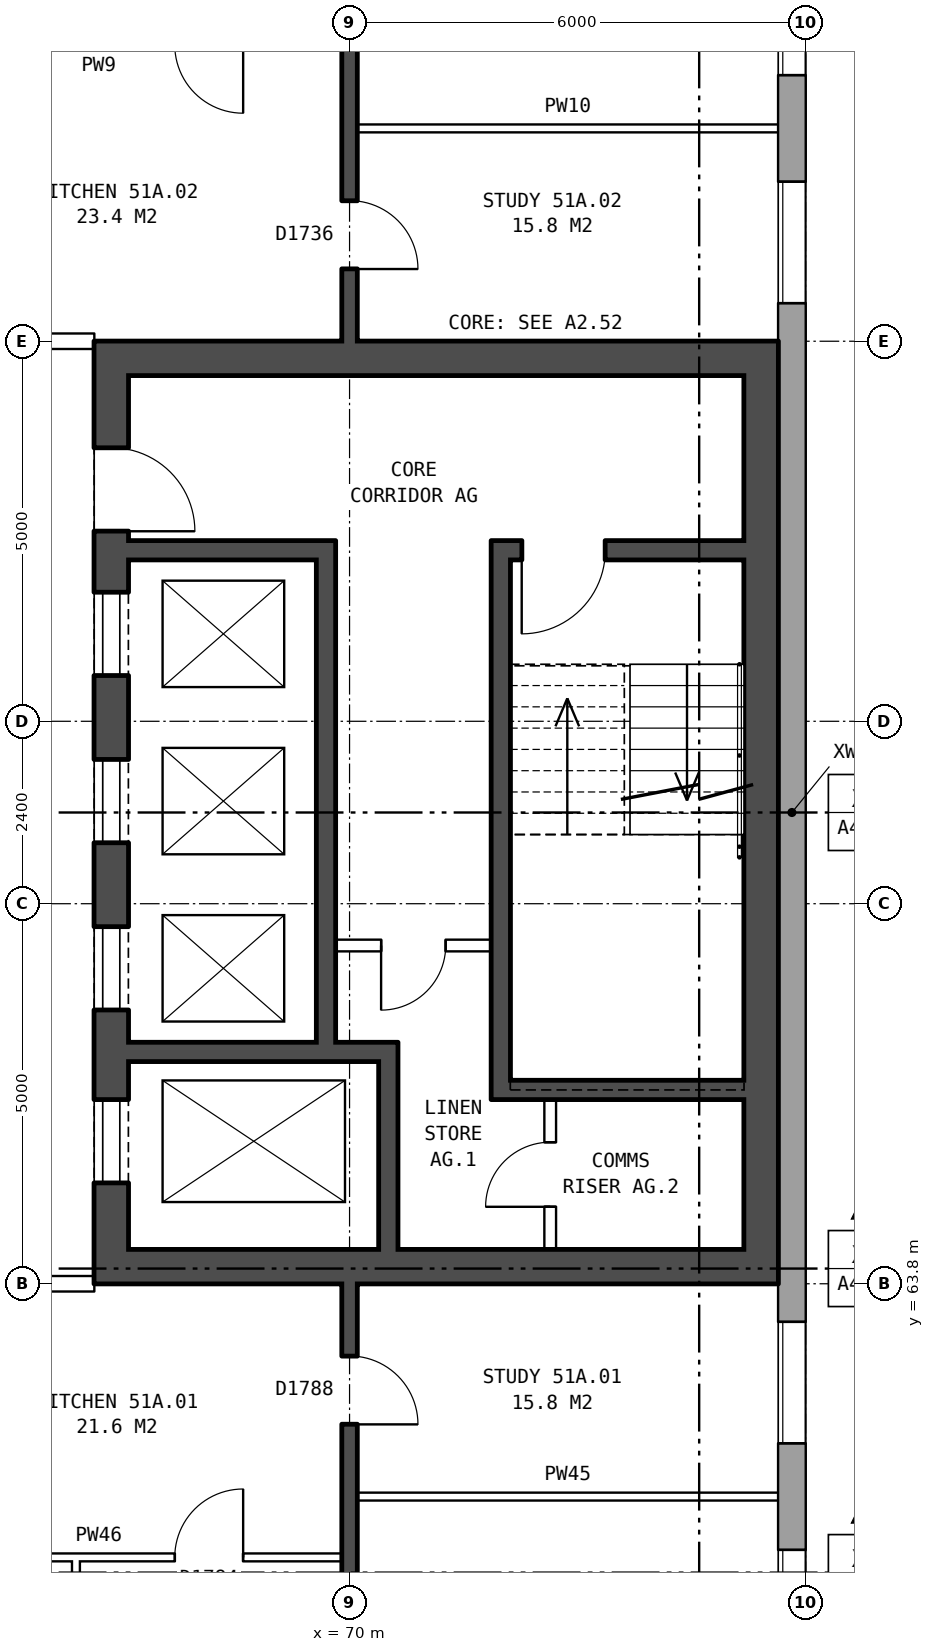
"""IFC4 building model, lengths in metres.
Left out: names, types, materials, properties, quantities, classifications, styles, units other than length and angle.
Written with IfcOpenShell. Run it as: python <this file> out.ifc"""

import sys

from ifc_helpers import new_model, si_unit, direction, frame, frame_2d, origin, place, context, subcontext, project, spatial, rectangle, extrude, element, fill, save


model = new_model("IFC4")
c1 = context("Model", 3, precision=1e-05, world=origin(), true_north=direction((0.0, 1.0)))
c2 = subcontext(c1, "Body", "Model", "MODEL_VIEW")
j1 = project(units=[si_unit("LENGTHUNIT", "METRE"), si_unit("PLANEANGLEUNIT", "RADIAN")], contexts=[c1])
p1 = place(None, origin())
s1 = spatial("IfcSite", under=j1, at=p1, CompositionType="ELEMENT")
p2 = place(p1, origin())
s2 = spatial("IfcBuilding", under=s1, at=p2, CompositionType="ELEMENT")
p3 = place(p2, frame((0.0, 0.0, 182.0)))
s3 = spatial("IfcBuildingStorey", under=s2, at=p3, CompositionType="ELEMENT", Elevation=182.0)
p4 = place(p3, frame((75.82, 57.075, 0.0), z_axis=(0.0, 0.0, 1.0), x_axis=(0.0, 1.0, 0.0)))
e1 = element("IfcWall", 1, at=p4, inside=s3, PredefinedType="STANDARD", context=c2, shape_type="SweptSolid", body=[
    extrude(rectangle(XDim=25.851, YDim=0.36, at=frame_2d((12.925, 0.0))), origin(), (0.0, 0.0, 1.0), 2.85),
])
p5 = place(p4, frame((1.625, 0.0, 0.8)))
e2 = element("IfcOpeningElement", 2, at=p5, cuts=e1, PredefinedType="OPENING", context=c2, shape_type="SweptSolid", body=[
    extrude(rectangle(XDim=1.6, YDim=1.8, at=frame_2d((0.8, 0.9))), frame((0.0, 0.19, 0.0), z_axis=(0.0, -1.0, 0.0), x_axis=(1.0, 0.0, 0.0)), (0.0, 0.0, 1.0), 0.38),
])
p6 = place(p4, frame((4.625, 0.0, 0.8)))
e3 = element("IfcOpeningElement", 3, at=p6, cuts=e1, PredefinedType="OPENING", context=c2, shape_type="SweptSolid", body=[
    extrude(rectangle(XDim=1.6, YDim=1.8, at=frame_2d((0.8, 0.9))), frame((0.0, 0.19, 0.0), z_axis=(0.0, -1.0, 0.0), x_axis=(1.0, 0.0, 0.0)), (0.0, 0.0, 1.0), 0.38),
])
p7 = place(p4, frame((19.625, 0.0, 0.8)))
e4 = element("IfcOpeningElement", 4, at=p7, cuts=e1, PredefinedType="OPENING", context=c2, shape_type="SweptSolid", body=[
    extrude(rectangle(XDim=1.6, YDim=1.8, at=frame_2d((0.8, 0.9))), frame((0.0, 0.19, 0.0), z_axis=(0.0, -1.0, 0.0), x_axis=(1.0, 0.0, 0.0)), (0.0, 0.0, 1.0), 0.38),
])
p8 = place(p4, frame((22.625, 0.0, 0.8)))
e5 = element("IfcOpeningElement", 5, at=p8, cuts=e1, PredefinedType="OPENING", context=c2, shape_type="SweptSolid", body=[
    extrude(rectangle(XDim=1.6, YDim=1.8, at=frame_2d((0.8, 0.9))), frame((0.0, 0.19, 0.0), z_axis=(0.0, -1.0, 0.0), x_axis=(1.0, 0.0, 0.0)), (0.0, 0.0, 1.0), 0.38),
])
p9 = place(p3, frame((66.865, 63.8, 0.0), z_axis=(0.0, 0.0, 1.0), x_axis=(0.0, 1.0, 0.0)))
e6 = element("IfcWall", 6, at=p9, inside=s3, PredefinedType="SHEAR", context=c2, shape_type="SweptSolid", body=[
    extrude(rectangle(XDim=12.4, YDim=0.45, at=frame_2d((6.2, 0.0))), origin(), (0.0, 0.0, 1.0), 2.85),
])
p10 = place(p9, frame((1.325, 0.0, 0.0)))
e7 = element("IfcOpeningElement", 7, at=p10, cuts=e6, PredefinedType="OPENING", context=c2, shape_type="SweptSolid", body=[
    extrude(rectangle(XDim=1.1, YDim=2.1, at=frame_2d((0.55, 1.05))), frame((0.0, 0.235, 0.0), z_axis=(0.0, -1.0, 0.0), x_axis=(1.0, 0.0, 0.0)), (0.0, 0.0, 1.0), 0.47),
])
p11 = place(p9, frame((3.6, 0.0, 0.0)))
e8 = element("IfcOpeningElement", 8, at=p11, cuts=e6, PredefinedType="OPENING", context=c2, shape_type="SweptSolid", body=[
    extrude(rectangle(XDim=1.1, YDim=2.1, at=frame_2d((0.55, 1.05))), frame((0.0, 0.235, 0.0), z_axis=(0.0, -1.0, 0.0), x_axis=(1.0, 0.0, 0.0)), (0.0, 0.0, 1.0), 0.47),
])
p12 = place(p9, frame((5.8, 0.0, 0.0)))
e9 = element("IfcOpeningElement", 9, at=p12, cuts=e6, PredefinedType="OPENING", context=c2, shape_type="SweptSolid", body=[
    extrude(rectangle(XDim=1.1, YDim=2.1, at=frame_2d((0.55, 1.05))), frame((0.0, 0.235, 0.0), z_axis=(0.0, -1.0, 0.0), x_axis=(1.0, 0.0, 0.0)), (0.0, 0.0, 1.0), 0.47),
])
p13 = place(p9, frame((8.0, 0.0, 0.0)))
e10 = element("IfcOpeningElement", 10, at=p13, cuts=e6, PredefinedType="OPENING", context=c2, shape_type="SweptSolid", body=[
    extrude(rectangle(XDim=1.1, YDim=2.1, at=frame_2d((0.55, 1.05))), frame((0.0, 0.235, 0.0), z_axis=(0.0, -1.0, 0.0), x_axis=(1.0, 0.0, 0.0)), (0.0, 0.0, 1.0), 0.47),
])
p14 = place(p9, frame((9.9, 0.0, 0.0)))
e11 = element("IfcOpeningElement", 11, at=p14, cuts=e6, PredefinedType="OPENING", context=c2, shape_type="SweptSolid", body=[
    extrude(rectangle(XDim=1.1, YDim=2.1, at=frame_2d((0.55, 1.05))), frame((0.0, 0.235, 0.0), z_axis=(0.0, -1.0, 0.0), x_axis=(1.0, 0.0, 0.0)), (0.0, 0.0, 1.0), 0.47),
])
p15 = place(p3, frame((75.415, 63.8, 0.0), z_axis=(0.0, 0.0, 1.0), x_axis=(0.0, 1.0, 0.0)))
e12 = element("IfcWall", 12, at=p15, inside=s3, PredefinedType="SHEAR", context=c2, shape_type="SweptSolid", body=[
    extrude(rectangle(XDim=12.4, YDim=0.45, at=frame_2d((6.2, 0.0))), origin(), (0.0, 0.0, 1.0), 2.85),
])
for number, where, z_axis, x_axis in (
    (13, (67.09, 64.025, 0.0), (0.0, 0.0, 1.0), (1.0, 0.0, 0.0)),
    (14, (67.09, 75.975, 0.0), (0.0, 0.0, 1.0), (1.0, 0.0, 0.0)),
):
    element("IfcWall", number, at=place(p3, frame(where, z_axis=z_axis, x_axis=x_axis)), inside=s3, PredefinedType="SHEAR", context=c2, shape_type="SweptSolid", body=[
        extrude(rectangle(XDim=8.1, YDim=0.45, at=frame_2d((4.05, 0.0))), origin(), (0.0, 0.0, 1.0), 2.85),
    ])
p16 = place(p3, frame((72.115, 66.35, 0.0), z_axis=(0.0, 0.0, 1.0), x_axis=(1.0, 0.0, 0.0)))
e15 = element("IfcWall", 15, at=p16, inside=s3, PredefinedType="SHEAR", context=c2, shape_type="SweptSolid", body=[
    extrude(rectangle(XDim=3.075, YDim=0.25, at=frame_2d((1.538, 0.0))), origin(), (0.0, 0.0, 1.0), 2.85),
])
p17 = place(p3, frame((67.09, 66.85, 0.0), z_axis=(0.0, 0.0, 1.0), x_axis=(1.0, 0.0, 0.0)))
e16 = element("IfcWall", 16, at=p17, inside=s3, PredefinedType="SHEAR", context=c2, shape_type="SweptSolid", body=[
    extrude(rectangle(XDim=3.545, YDim=0.25, at=frame_2d((1.772, 0.0))), origin(), (0.0, 0.0, 1.0), 2.85),
])
p18 = place(p3, frame((69.815, 68.25, 0.0), z_axis=(0.0, 0.0, 1.0), x_axis=(1.0, 0.0, 0.0)))
e17 = element("IfcWall", 17, at=p18, inside=s3, PredefinedType="PARTITIONING", context=c2, shape_type="SweptSolid", body=[
    extrude(rectangle(XDim=2.05, YDim=0.15, at=frame_2d((1.025, 0.0))), origin(), (0.0, 0.0, 1.0), 2.85),
])
p19 = place(p18, frame((0.6, 0.0, 0.0)))
e18 = element("IfcOpeningElement", 18, at=p19, cuts=e17, PredefinedType="OPENING", context=c2, shape_type="SweptSolid", body=[
    extrude(rectangle(XDim=0.85, YDim=2.1, at=frame_2d((0.425, 1.05))), frame((0.0, 0.085, 0.0), z_axis=(0.0, -1.0, 0.0), x_axis=(1.0, 0.0, 0.0)), (0.0, 0.0, 1.0), 0.17),
])
p20 = place(p3, frame((67.09, 73.45, 0.0), z_axis=(0.0, 0.0, 1.0), x_axis=(1.0, 0.0, 0.0)))
e19 = element("IfcWall", 19, at=p20, inside=s3, PredefinedType="SHEAR", context=c2, shape_type="SweptSolid", body=[
    extrude(rectangle(XDim=2.475, YDim=0.25, at=frame_2d((1.237, 0.0))), origin(), (0.0, 0.0, 1.0), 2.85),
])
p21 = place(p3, frame((72.115, 73.45, 0.0), z_axis=(0.0, 0.0, 1.0), x_axis=(1.0, 0.0, 0.0)))
e20 = element("IfcWall", 20, at=p21, inside=s3, PredefinedType="SHEAR", context=c2, shape_type="SweptSolid", body=[
    extrude(rectangle(XDim=3.075, YDim=0.25, at=frame_2d((1.538, 0.0))), origin(), (0.0, 0.0, 1.0), 2.85),
])
p22 = place(p21, frame((0.15, 0.0, 0.0)))
e21 = element("IfcOpeningElement", 21, at=p22, cuts=e20, PredefinedType="OPENING", context=c2, shape_type="SweptSolid", body=[
    extrude(rectangle(XDim=1.1, YDim=2.1, at=frame_2d((0.55, 1.05))), frame((0.0, 0.135, 0.0), z_axis=(0.0, -1.0, 0.0), x_axis=(1.0, 0.0, 0.0)), (0.0, 0.0, 1.0), 0.27),
])
p23 = place(p3, frame((69.69, 66.975, 0.0), z_axis=(0.0, 0.0, 1.0), x_axis=(0.0, 1.0, 0.0)))
e22 = element("IfcWall", 22, at=p23, inside=s3, PredefinedType="SHEAR", context=c2, shape_type="SweptSolid", body=[
    extrude(rectangle(XDim=6.6, YDim=0.25, at=frame_2d((3.3, 0.0))), origin(), (0.0, 0.0, 1.0), 2.85),
])
p24 = place(p3, frame((70.51, 64.25, 0.0), z_axis=(0.0, 0.0, 1.0), x_axis=(0.0, 1.0, 0.0)))
e23 = element("IfcWall", 23, at=p24, inside=s3, PredefinedType="SHEAR", context=c2, shape_type="SweptSolid", body=[
    extrude(rectangle(XDim=2.475, YDim=0.25, at=frame_2d((1.238, 0.0))), origin(), (0.0, 0.0, 1.0), 2.85),
])
p25 = place(p3, frame((71.99, 66.225, 0.0), z_axis=(0.0, 0.0, 1.0), x_axis=(0.0, 1.0, 0.0)))
e24 = element("IfcWall", 24, at=p25, inside=s3, PredefinedType="SHEAR", context=c2, shape_type="SweptSolid", body=[
    extrude(rectangle(XDim=7.35, YDim=0.25, at=frame_2d((3.675, 0.0))), origin(), (0.0, 0.0, 1.0), 2.85),
])
p26 = place(p3, frame((72.64, 64.25, 0.0), z_axis=(0.0, 0.0, 1.0), x_axis=(0.0, 1.0, 0.0)))
e25 = element("IfcWall", 25, at=p26, inside=s3, PredefinedType="PARTITIONING", context=c2, shape_type="SweptSolid", body=[
    extrude(rectangle(XDim=1.975, YDim=0.15, at=frame_2d((0.988, 0.0))), origin(), (0.0, 0.0, 1.0), 2.85),
])
p27 = place(p26, frame((0.562, 0.0, 0.0)))
e26 = element("IfcOpeningElement", 26, at=p27, cuts=e25, PredefinedType="OPENING", context=c2, shape_type="SweptSolid", body=[
    extrude(rectangle(XDim=0.85, YDim=2.1, at=frame_2d((0.425, 1.05))), frame((0.0, 0.085, 0.0), z_axis=(0.0, -1.0, 0.0), x_axis=(1.0, 0.0, 0.0)), (0.0, 0.0, 1.0), 0.17),
])
p28 = place(p3, frame((64.1, 60.2, 0.0), z_axis=(0.0, 0.0, 1.0), x_axis=(1.0, 0.0, 0.0)))
e27 = element("IfcWall", 27, at=p28, inside=s3, PredefinedType="PARTITIONING", context=c2, shape_type="SweptSolid", body=[
    extrude(rectangle(XDim=5.8, YDim=0.1, at=frame_2d((2.9, 0.0))), origin(), (0.0, 0.0, 1.0), 2.85),
])
p29 = place(p28, frame((3.6, 0.0, 0.0)))
e28 = element("IfcOpeningElement", 28, at=p29, cuts=e27, PredefinedType="OPENING", context=c2, shape_type="SweptSolid", body=[
    extrude(rectangle(XDim=0.9, YDim=2.1, at=frame_2d((0.45, 1.05))), frame((0.0, 0.06, 0.0), z_axis=(0.0, -1.0, 0.0), x_axis=(1.0, 0.0, 0.0)), (0.0, 0.0, 1.0), 0.12),
])
p30 = place(p28, frame((0.7, 0.0, 0.0)))
e29 = element("IfcOpeningElement", 29, at=p30, cuts=e27, PredefinedType="OPENING", context=c2, shape_type="SweptSolid", body=[
    extrude(rectangle(XDim=0.9, YDim=2.1, at=frame_2d((0.45, 1.05))), frame((0.0, 0.06, 0.0), z_axis=(0.0, -1.0, 0.0), x_axis=(1.0, 0.0, 0.0)), (0.0, 0.0, 1.0), 0.12),
])
p31 = place(p3, frame((70.1, 61.0, 0.0), z_axis=(0.0, 0.0, 1.0), x_axis=(1.0, 0.0, 0.0)))
e30 = element("IfcWall", 30, at=p31, inside=s3, PredefinedType="PARTITIONING", context=c2, shape_type="SweptSolid", body=[
    extrude(rectangle(XDim=5.54, YDim=0.1, at=frame_2d((2.77, 0.0))), origin(), (0.0, 0.0, 1.0), 2.85),
])
p32 = place(p3, frame((63.64, 63.8, 0.0), z_axis=(0.0, 0.0, 1.0), x_axis=(1.0, 0.0, 0.0)))
e31 = element("IfcWall", 31, at=p32, inside=s3, PredefinedType="PARTITIONING", context=c2, shape_type="SweptSolid", body=[
    extrude(rectangle(XDim=3.0, YDim=0.2, at=frame_2d((1.5, 0.0))), origin(), (0.0, 0.0, 1.0), 2.85),
])
p33 = place(p32, frame((1.18, 0.0, 0.0)))
e32 = element("IfcOpeningElement", 32, at=p33, cuts=e31, PredefinedType="OPENING", context=c2, shape_type="SweptSolid", body=[
    extrude(rectangle(XDim=1.0, YDim=2.1, at=frame_2d((0.5, 1.05))), frame((0.0, 0.11, 0.0), z_axis=(0.0, -1.0, 0.0), x_axis=(1.0, 0.0, 0.0)), (0.0, 0.0, 1.0), 0.22),
])
p34 = place(p3, frame((63.64, 76.2, 0.0), z_axis=(0.0, 0.0, 1.0), x_axis=(1.0, 0.0, 0.0)))
e33 = element("IfcWall", 33, at=p34, inside=s3, PredefinedType="PARTITIONING", context=c2, shape_type="SweptSolid", body=[
    extrude(rectangle(XDim=3.0, YDim=0.2, at=frame_2d((1.5, 0.0))), origin(), (0.0, 0.0, 1.0), 2.85),
])
p35 = place(p34, frame((1.18, 0.0, 0.0)))
e34 = element("IfcOpeningElement", 34, at=p35, cuts=e33, PredefinedType="OPENING", context=c2, shape_type="SweptSolid", body=[
    extrude(rectangle(XDim=1.0, YDim=2.1, at=frame_2d((0.5, 1.05))), frame((0.0, 0.11, 0.0), z_axis=(0.0, -1.0, 0.0), x_axis=(1.0, 0.0, 0.0)), (0.0, 0.0, 1.0), 0.22),
])
p36 = place(p3, frame((70.1, 79.0, 0.0), z_axis=(0.0, 0.0, 1.0), x_axis=(1.0, 0.0, 0.0)))
e35 = element("IfcWall", 35, at=p36, inside=s3, PredefinedType="PARTITIONING", context=c2, shape_type="SweptSolid", body=[
    extrude(rectangle(XDim=5.54, YDim=0.1, at=frame_2d((2.77, 0.0))), origin(), (0.0, 0.0, 1.0), 2.85),
])
p37 = place(p3, frame((66.4, 57.85, 0.0), z_axis=(0.0, 0.0, 1.0), x_axis=(0.0, 1.0, 0.0)))
e36 = element("IfcWall", 36, at=p37, inside=s3, PredefinedType="PARTITIONING", context=c2, shape_type="SweptSolid", body=[
    extrude(rectangle(XDim=2.3, YDim=0.1, at=frame_2d((1.15, 0.0))), origin(), (0.0, 0.0, 1.0), 2.85),
])
p38 = place(p3, frame((70.0, 54.36, 0.0), z_axis=(0.0, 0.0, 1.0), x_axis=(0.0, 1.0, 0.0)))
e37 = element("IfcWall", 37, at=p38, inside=s3, PredefinedType="SOLIDWALL", context=c2, shape_type="SweptSolid", body=[
    extrude(rectangle(XDim=9.44, YDim=0.2, at=frame_2d((4.72, 0.0))), origin(), (0.0, 0.0, 1.0), 2.85),
])
p39 = place(p38, frame((2.47, 0.0, 0.0)))
e38 = element("IfcOpeningElement", 38, at=p39, cuts=e37, PredefinedType="OPENING", context=c2, shape_type="SweptSolid", body=[
    extrude(rectangle(XDim=0.9, YDim=2.1, at=frame_2d((0.45, 1.05))), frame((0.0, 0.11, 0.0), z_axis=(0.0, -1.0, 0.0), x_axis=(1.0, 0.0, 0.0)), (0.0, 0.0, 1.0), 0.22),
])
p40 = place(p38, frame((7.59, 0.0, 0.0)))
e39 = element("IfcOpeningElement", 39, at=p40, cuts=e37, PredefinedType="OPENING", context=c2, shape_type="SweptSolid", body=[
    extrude(rectangle(XDim=0.9, YDim=2.1, at=frame_2d((0.45, 1.05))), frame((0.0, 0.11, 0.0), z_axis=(0.0, -1.0, 0.0), x_axis=(1.0, 0.0, 0.0)), (0.0, 0.0, 1.0), 0.22),
])
p41 = place(p3, frame((70.0, 76.2, 0.0), z_axis=(0.0, 0.0, 1.0), x_axis=(0.0, 1.0, 0.0)))
e40 = element("IfcWall", 40, at=p41, inside=s3, PredefinedType="SOLIDWALL", context=c2, shape_type="SweptSolid", body=[
    extrude(rectangle(XDim=9.44, YDim=0.2, at=frame_2d((4.72, 0.0))), origin(), (0.0, 0.0, 1.0), 2.85),
])
p42 = place(p41, frame((6.22, 0.0, 0.0)))
e41 = element("IfcOpeningElement", 41, at=p42, cuts=e40, PredefinedType="OPENING", context=c2, shape_type="SweptSolid", body=[
    extrude(rectangle(XDim=0.9, YDim=2.1, at=frame_2d((0.45, 1.05))), frame((0.0, 0.11, 0.0), z_axis=(0.0, -1.0, 0.0), x_axis=(1.0, 0.0, 0.0)), (0.0, 0.0, 1.0), 0.22),
])
p43 = place(p41, frame((0.95, 0.0, 0.0)))
e42 = element("IfcOpeningElement", 42, at=p43, cuts=e40, PredefinedType="OPENING", context=c2, shape_type="SweptSolid", body=[
    extrude(rectangle(XDim=0.9, YDim=2.1, at=frame_2d((0.45, 1.05))), frame((0.0, 0.11, 0.0), z_axis=(0.0, -1.0, 0.0), x_axis=(1.0, 0.0, 0.0)), (0.0, 0.0, 1.0), 0.22),
])
p44 = place(p5, origin())
e43 = element("IfcWindow", 43, at=p44, inside=s3, PartitioningType="SINGLE_PANEL", PredefinedType="WINDOW", context=c2, shape_type="SweptSolid", body=[
    extrude(rectangle(XDim=1.6, YDim=1.8, at=frame_2d((0.8, 0.9))), frame((0.0, 0.15, 0.0), z_axis=(0.0, -1.0, 0.0), x_axis=(1.0, 0.0, 0.0)), (0.0, 0.0, 1.0), 0.06),
])
fill(e2, e43)
p45 = place(p6, origin())
e44 = element("IfcWindow", 44, at=p45, inside=s3, PartitioningType="SINGLE_PANEL", PredefinedType="WINDOW", context=c2, shape_type="SweptSolid", body=[
    extrude(rectangle(XDim=1.6, YDim=1.8, at=frame_2d((0.8, 0.9))), frame((0.0, 0.15, 0.0), z_axis=(0.0, -1.0, 0.0), x_axis=(1.0, 0.0, 0.0)), (0.0, 0.0, 1.0), 0.06),
])
fill(e3, e44)
p46 = place(p7, origin())
e45 = element("IfcWindow", 45, at=p46, inside=s3, PartitioningType="SINGLE_PANEL", PredefinedType="WINDOW", context=c2, shape_type="SweptSolid", body=[
    extrude(rectangle(XDim=1.6, YDim=1.8, at=frame_2d((0.8, 0.9))), frame((0.0, 0.15, 0.0), z_axis=(0.0, -1.0, 0.0), x_axis=(1.0, 0.0, 0.0)), (0.0, 0.0, 1.0), 0.06),
])
fill(e4, e45)
p47 = place(p8, origin())
e46 = element("IfcWindow", 46, at=p47, inside=s3, PartitioningType="SINGLE_PANEL", PredefinedType="WINDOW", context=c2, shape_type="SweptSolid", body=[
    extrude(rectangle(XDim=1.6, YDim=1.8, at=frame_2d((0.8, 0.9))), frame((0.0, 0.15, 0.0), z_axis=(0.0, -1.0, 0.0), x_axis=(1.0, 0.0, 0.0)), (0.0, 0.0, 1.0), 0.06),
])
fill(e5, e46)
p48 = place(p10, origin())
e47 = element("IfcDoor", 47, at=p48, inside=s3, OperationType="DOUBLE_DOOR_SLIDING", PredefinedType="DOOR", context=c2, shape_type="SweptSolid", body=[
    extrude(rectangle(XDim=1.1, YDim=2.1, at=frame_2d((0.55, 1.05))), frame((0.0, -0.16, 0.0), z_axis=(0.0, -1.0, 0.0), x_axis=(1.0, 0.0, 0.0)), (0.0, 0.0, 1.0), 0.05),
])
fill(e7, e47)
p49 = place(p11, origin())
e48 = element("IfcDoor", 48, at=p49, inside=s3, OperationType="DOUBLE_DOOR_SLIDING", PredefinedType="DOOR", context=c2, shape_type="SweptSolid", body=[
    extrude(rectangle(XDim=1.1, YDim=2.1, at=frame_2d((0.55, 1.05))), frame((0.0, -0.16, 0.0), z_axis=(0.0, -1.0, 0.0), x_axis=(1.0, 0.0, 0.0)), (0.0, 0.0, 1.0), 0.05),
])
fill(e8, e48)
p50 = place(p12, origin())
e49 = element("IfcDoor", 49, at=p50, inside=s3, OperationType="DOUBLE_DOOR_SLIDING", PredefinedType="DOOR", context=c2, shape_type="SweptSolid", body=[
    extrude(rectangle(XDim=1.1, YDim=2.1, at=frame_2d((0.55, 1.05))), frame((0.0, -0.16, 0.0), z_axis=(0.0, -1.0, 0.0), x_axis=(1.0, 0.0, 0.0)), (0.0, 0.0, 1.0), 0.05),
])
fill(e9, e49)
p51 = place(p13, origin())
e50 = element("IfcDoor", 50, at=p51, inside=s3, OperationType="DOUBLE_DOOR_SLIDING", PredefinedType="DOOR", context=c2, shape_type="SweptSolid", body=[
    extrude(rectangle(XDim=1.1, YDim=2.1, at=frame_2d((0.55, 1.05))), frame((0.0, -0.16, 0.0), z_axis=(0.0, -1.0, 0.0), x_axis=(1.0, 0.0, 0.0)), (0.0, 0.0, 1.0), 0.05),
])
fill(e10, e50)
p52 = place(p14, frame((1.1, 0.0, 0.0), z_axis=(0.0, 0.0, 1.0), x_axis=(-1.0, 0.0, 0.0)))
e51 = element("IfcDoor", 51, at=p52, inside=s3, OperationType="SINGLE_SWING_RIGHT", PredefinedType="DOOR", context=c2, shape_type="SweptSolid", body=[
    extrude(rectangle(XDim=1.1, YDim=2.1, at=frame_2d((0.55, 1.05))), frame((0.0, 0.21, 0.0), z_axis=(0.0, -1.0, 0.0), x_axis=(1.0, 0.0, 0.0)), (0.0, 0.0, 1.0), 0.05),
])
fill(e11, e51)
p53 = place(p22, frame((1.1, 0.0, 0.0), z_axis=(0.0, 0.0, 1.0), x_axis=(-1.0, 0.0, 0.0)))
e52 = element("IfcDoor", 52, at=p53, inside=s3, OperationType="SINGLE_SWING_RIGHT", PredefinedType="DOOR", context=c2, shape_type="SweptSolid", body=[
    extrude(rectangle(XDim=1.1, YDim=2.1, at=frame_2d((0.55, 1.05))), frame((0.0, 0.025, 0.0), z_axis=(0.0, -1.0, 0.0), x_axis=(1.0, 0.0, 0.0)), (0.0, 0.0, 1.0), 0.05),
])
fill(e21, e52)
p54 = place(p19, frame((0.85, 0.0, 0.0), z_axis=(0.0, 0.0, 1.0), x_axis=(-1.0, 0.0, 0.0)))
e53 = element("IfcDoor", 53, at=p54, inside=s3, OperationType="SINGLE_SWING_RIGHT", PredefinedType="DOOR", context=c2, shape_type="SweptSolid", body=[
    extrude(rectangle(XDim=0.85, YDim=2.1, at=frame_2d((0.425, 1.05))), frame((0.0, 0.025, 0.0), z_axis=(0.0, -1.0, 0.0), x_axis=(1.0, 0.0, 0.0)), (0.0, 0.0, 1.0), 0.05),
])
fill(e18, e53)
p55 = place(p27, origin())
e54 = element("IfcDoor", 54, at=p55, inside=s3, OperationType="SINGLE_SWING_LEFT", PredefinedType="DOOR", context=c2, shape_type="SweptSolid", body=[
    extrude(rectangle(XDim=0.85, YDim=2.1, at=frame_2d((0.425, 1.05))), frame((0.0, 0.025, 0.0), z_axis=(0.0, -1.0, 0.0), x_axis=(1.0, 0.0, 0.0)), (0.0, 0.0, 1.0), 0.05),
])
fill(e26, e54)
p56 = place(p40, frame((0.9, 0.0, 0.0), z_axis=(0.0, 0.0, 1.0), x_axis=(-1.0, 0.0, 0.0)))
e55 = element("IfcDoor", 55, at=p56, inside=s3, OperationType="SINGLE_SWING_RIGHT", PredefinedType="DOOR", context=c2, shape_type="SweptSolid", body=[
    extrude(rectangle(XDim=0.9, YDim=2.1, at=frame_2d((0.45, 1.05))), frame((0.0, 0.025, 0.0), z_axis=(0.0, -1.0, 0.0), x_axis=(1.0, 0.0, 0.0)), (0.0, 0.0, 1.0), 0.05),
])
fill(e39, e55)
p57 = place(p29, origin())
e56 = element("IfcDoor", 56, at=p57, inside=s3, OperationType="SINGLE_SWING_RIGHT", PredefinedType="DOOR", context=c2, shape_type="SweptSolid", body=[
    extrude(rectangle(XDim=0.9, YDim=2.1, at=frame_2d((0.45, 1.05))), frame((0.0, 0.025, 0.0), z_axis=(0.0, -1.0, 0.0), x_axis=(1.0, 0.0, 0.0)), (0.0, 0.0, 1.0), 0.05),
])
fill(e28, e56)
p58 = place(p43, frame((0.9, 0.0, 0.0), z_axis=(0.0, 0.0, 1.0), x_axis=(-1.0, 0.0, 0.0)))
e57 = element("IfcDoor", 57, at=p58, inside=s3, OperationType="SINGLE_SWING_RIGHT", PredefinedType="DOOR", context=c2, shape_type="SweptSolid", body=[
    extrude(rectangle(XDim=0.9, YDim=2.1, at=frame_2d((0.45, 1.05))), frame((0.0, 0.025, 0.0), z_axis=(0.0, -1.0, 0.0), x_axis=(1.0, 0.0, 0.0)), (0.0, 0.0, 1.0), 0.05),
])
fill(e42, e57)
save(model, sys.argv[1])
